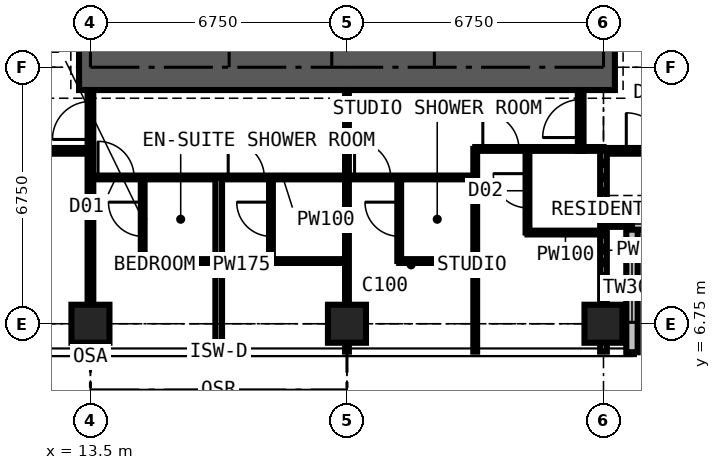
"""IFC4 building model, lengths in metres.
Left out: names, types, materials, properties, quantities, classifications, styles, units other than length and angle.
Written with IfcOpenShell. Run it as: python <this file> out.ifc"""

import sys

from ifc_helpers import new_model, si_unit, direction, frame, frame_2d, origin, origin_2d, place, context, subcontext, project, spatial, rectangle, extrude, element, fill, save


model = new_model("IFC4")
c1 = context("Model", 3, precision=1e-05, world=origin(), true_north=direction((0.0, 1.0)))
c2 = subcontext(c1, "Body", "Model", "MODEL_VIEW")
j1 = project(units=[si_unit("LENGTHUNIT", "METRE"), si_unit("PLANEANGLEUNIT", "RADIAN")], contexts=[c1])
p1 = place(None, origin())
s1 = spatial("IfcSite", under=j1, at=p1, CompositionType="ELEMENT")
p2 = place(p1, origin())
s2 = spatial("IfcBuilding", under=s1, at=p2, CompositionType="ELEMENT")
p3 = place(p2, frame((0.0, 0.0, 243.9)))
s3 = spatial("IfcBuildingStorey", under=s2, at=p3, CompositionType="ELEMENT", Elevation=243.9)
for number, where, z_axis, x_axis in (
    (1, (13.5, 6.75, 0.0), (0.0, 0.0, 1.0), (1.0, 0.0, 0.0)),
    (2, (20.25, 6.75, 0.0), (0.0, 0.0, 1.0), (1.0, 0.0, 0.0)),
    (3, (27.0, 6.75, 0.0), (0.0, 0.0, 1.0), (1.0, 0.0, 0.0)),
):
    element("IfcColumn", number, at=place(p3, frame(where, z_axis=z_axis, x_axis=x_axis)), inside=s3, PredefinedType="COLUMN", context=c2, shape_type="SweptSolid", body=[
        extrude(rectangle(XDim=1.0, YDim=1.0, at=origin_2d()), origin(), (0.0, 0.0, 1.0), 3.6),
    ])
p4 = place(p3, frame((13.2, 13.5, 0.0), z_axis=(0.0, 0.0, 1.0), x_axis=(1.0, 0.0, 0.0)))
e4 = element("IfcWall", 4, at=p4, inside=s3, PredefinedType="SHEAR", context=c2, shape_type="SweptSolid", body=[
    extrude(rectangle(XDim=14.1, YDim=1.2, at=frame_2d((7.05, 0.0))), origin(), (0.0, 0.0, 1.0), 3.6),
])
p5 = place(p3, frame((27.75, 6.0, 0.0), z_axis=(0.0, 0.0, 1.0), x_axis=(0.0, 1.0, 0.0)))
e5 = element("IfcWall", 5, at=p5, inside=s3, PredefinedType="SOLIDWALL", context=c2, shape_type="SweptSolid", body=[
    extrude(rectangle(XDim=3.375, YDim=0.3, at=frame_2d((1.688, 0.0))), origin(), (0.0, 0.0, 1.0), 3.375),
])
p6 = place(p5, frame((0.788, 0.0, 0.6)))
e6 = element("IfcOpeningElement", 6, at=p6, cuts=e5, PredefinedType="OPENING", context=c2, shape_type="SweptSolid", body=[
    extrude(rectangle(XDim=1.8, YDim=2.1, at=frame_2d((0.9, 1.05))), frame((0.0, 0.16, 0.0), z_axis=(0.0, -1.0, 0.0), x_axis=(1.0, 0.0, 0.0)), (0.0, 0.0, 1.0), 0.32),
])
p7 = place(p3, frame((27.75, 9.375, 0.0), z_axis=(0.0, 0.0, 1.0), x_axis=(1.0, 0.0, 0.0)))
e7 = element("IfcWall", 7, at=p7, inside=s3, PredefinedType="SOLIDWALL", context=c2, shape_type="SweptSolid", body=[
    extrude(rectangle(XDim=3.375, YDim=0.3, at=frame_2d((1.688, 0.0))), origin(), (0.0, 0.0, 1.0), 3.375),
])
p8 = place(p7, frame((0.788, 0.0, 0.6)))
e8 = element("IfcOpeningElement", 8, at=p8, cuts=e7, PredefinedType="OPENING", context=c2, shape_type="SweptSolid", body=[
    extrude(rectangle(XDim=1.8, YDim=2.1, at=frame_2d((0.9, 1.05))), frame((0.0, 0.16, 0.0), z_axis=(0.0, -1.0, 0.0), x_axis=(1.0, 0.0, 0.0)), (0.0, 0.0, 1.0), 0.32),
])
p9 = place(p3, frame((10.125, 11.3, 0.0), z_axis=(0.0, 0.0, 1.0), x_axis=(1.0, 0.0, 0.0)))
e9 = element("IfcWall", 9, at=p9, inside=s3, PredefinedType="PARTITIONING", context=c2, shape_type="SweptSolid", body=[
    extrude(rectangle(XDim=3.375, YDim=0.15, at=frame_2d((1.688, 0.0))), origin(), (0.0, 0.0, 1.0), 3.375),
])
p10 = place(p3, frame((13.5, 6.016, 0.0), z_axis=(0.0, 0.0, 1.0), x_axis=(0.0, 1.0, 0.0)))
e10 = element("IfcWall", 10, at=p10, inside=s3, PredefinedType="PARTITIONING", context=c2, shape_type="SweptSolid", body=[
    extrude(rectangle(XDim=6.884, YDim=0.15, at=frame_2d((3.442, 0.0))), origin(), (0.0, 0.0, 1.0), 2.61),
])
p11 = place(p10, frame((5.584, 0.0, 0.0)))
e11 = element("IfcOpeningElement", 11, at=p11, cuts=e10, PredefinedType="OPENING", context=c2, shape_type="SweptSolid", body=[
    extrude(rectangle(XDim=1.0, YDim=2.2, at=frame_2d((0.5, 1.1))), frame((0.0, 0.085, 0.0), z_axis=(0.0, -1.0, 0.0), x_axis=(1.0, 0.0, 0.0)), (0.0, 0.0, 1.0), 0.17),
])
p12 = place(p3, frame((13.5, 10.6, 0.0), z_axis=(0.0, 0.0, 1.0), x_axis=(1.0, 0.0, 0.0)))
e12 = element("IfcWall", 12, at=p12, inside=s3, PredefinedType="PARTITIONING", context=c2, shape_type="SweptSolid", body=[
    extrude(rectangle(XDim=10.125, YDim=0.1, at=frame_2d((5.062, 0.0))), origin(), (0.0, 0.0, 1.0), 3.375),
])
p13 = place(p12, frame((0.2, 0.0, 0.0)))
e13 = element("IfcOpeningElement", 13, at=p13, cuts=e12, PredefinedType="OPENING", context=c2, shape_type="SweptSolid", body=[
    extrude(rectangle(XDim=0.95, YDim=2.2, at=frame_2d((0.475, 1.1))), frame((0.0, 0.06, 0.0), z_axis=(0.0, -1.0, 0.0), x_axis=(1.0, 0.0, 0.0)), (0.0, 0.0, 1.0), 0.12),
])
p14 = place(p12, frame((3.625, 0.0, 0.0)))
e14 = element("IfcOpeningElement", 14, at=p14, cuts=e12, PredefinedType="OPENING", context=c2, shape_type="SweptSolid", body=[
    extrude(rectangle(XDim=0.95, YDim=2.2, at=frame_2d((0.475, 1.1))), frame((0.0, 0.06, 0.0), z_axis=(0.0, -1.0, 0.0), x_axis=(1.0, 0.0, 0.0)), (0.0, 0.0, 1.0), 0.12),
])
p15 = place(p12, frame((6.95, 0.0, 0.0)))
e15 = element("IfcOpeningElement", 15, at=p15, cuts=e12, PredefinedType="OPENING", context=c2, shape_type="SweptSolid", body=[
    extrude(rectangle(XDim=0.95, YDim=2.2, at=frame_2d((0.475, 1.1))), frame((0.0, 0.06, 0.0), z_axis=(0.0, -1.0, 0.0), x_axis=(1.0, 0.0, 0.0)), (0.0, 0.0, 1.0), 0.12),
])
p16 = place(p3, frame((14.875, 8.4, 0.0), z_axis=(0.0, 0.0, 1.0), x_axis=(0.0, 1.0, 0.0)))
e16 = element("IfcWall", 16, at=p16, inside=s3, PredefinedType="PARTITIONING", context=c2, shape_type="SweptSolid", body=[
    extrude(rectangle(XDim=2.2, YDim=0.1, at=frame_2d((1.1, 0.0))), origin(), (0.0, 0.0, 1.0), 3.375),
])
p17 = place(p16, frame((0.65, 0.0, 0.0)))
e17 = element("IfcOpeningElement", 17, at=p17, cuts=e16, PredefinedType="OPENING", context=c2, shape_type="SweptSolid", body=[
    extrude(rectangle(XDim=0.9, YDim=2.2, at=frame_2d((0.45, 1.1))), frame((0.0, 0.06, 0.0), z_axis=(0.0, -1.0, 0.0), x_axis=(1.0, 0.0, 0.0)), (0.0, 0.0, 1.0), 0.12),
])
p18 = place(p3, frame((14.875, 8.4, 0.0), z_axis=(0.0, 0.0, 1.0), x_axis=(1.0, 0.0, 0.0)))
e18 = element("IfcWall", 18, at=p18, inside=s3, PredefinedType="PARTITIONING", context=c2, shape_type="SweptSolid", body=[
    extrude(rectangle(XDim=2.0, YDim=0.1, at=frame_2d((1.0, 0.0))), origin(), (0.0, 0.0, 1.0), 3.375),
])
p19 = place(p3, frame((16.875, 6.016, 0.0), z_axis=(0.0, 0.0, 1.0), x_axis=(0.0, 1.0, 0.0)))
e19 = element("IfcWall", 19, at=p19, inside=s3, PredefinedType="PARTITIONING", context=c2, shape_type="SweptSolid", body=[
    extrude(rectangle(XDim=4.584, YDim=0.175, at=frame_2d((2.292, 0.0))), origin(), (0.0, 0.0, 1.0), 3.375),
])
p20 = place(p3, frame((18.25, 8.4, 0.0), z_axis=(0.0, 0.0, 1.0), x_axis=(0.0, 1.0, 0.0)))
e20 = element("IfcWall", 20, at=p20, inside=s3, PredefinedType="PARTITIONING", context=c2, shape_type="SweptSolid", body=[
    extrude(rectangle(XDim=2.2, YDim=0.1, at=frame_2d((1.1, 0.0))), origin(), (0.0, 0.0, 1.0), 3.375),
])
p21 = place(p20, frame((0.65, 0.0, 0.0)))
e21 = element("IfcOpeningElement", 21, at=p21, cuts=e20, PredefinedType="OPENING", context=c2, shape_type="SweptSolid", body=[
    extrude(rectangle(XDim=0.9, YDim=2.2, at=frame_2d((0.45, 1.1))), frame((0.0, 0.06, 0.0), z_axis=(0.0, -1.0, 0.0), x_axis=(1.0, 0.0, 0.0)), (0.0, 0.0, 1.0), 0.12),
])
p22 = place(p3, frame((18.25, 8.4, 0.0), z_axis=(0.0, 0.0, 1.0), x_axis=(1.0, 0.0, 0.0)))
e22 = element("IfcWall", 22, at=p22, inside=s3, PredefinedType="PARTITIONING", context=c2, shape_type="SweptSolid", body=[
    extrude(rectangle(XDim=2.0, YDim=0.1, at=frame_2d((1.0, 0.0))), origin(), (0.0, 0.0, 1.0), 3.375),
])
p23 = place(p3, frame((20.25, 6.016, 0.0), z_axis=(0.0, 0.0, 1.0), x_axis=(0.0, 1.0, 0.0)))
e23 = element("IfcWall", 23, at=p23, inside=s3, PredefinedType="PARTITIONING", context=c2, shape_type="SweptSolid", body=[
    extrude(rectangle(XDim=6.884, YDim=0.1, at=frame_2d((3.442, 0.0))), origin(), (0.0, 0.0, 1.0), 2.61),
])
p24 = place(p3, frame((21.625, 8.4, 0.0), z_axis=(0.0, 0.0, 1.0), x_axis=(0.0, 1.0, 0.0)))
e24 = element("IfcWall", 24, at=p24, inside=s3, PredefinedType="PARTITIONING", context=c2, shape_type="SweptSolid", body=[
    extrude(rectangle(XDim=2.2, YDim=0.1, at=frame_2d((1.1, 0.0))), origin(), (0.0, 0.0, 1.0), 3.375),
])
p25 = place(p24, frame((0.65, 0.0, 0.0)))
e25 = element("IfcOpeningElement", 25, at=p25, cuts=e24, PredefinedType="OPENING", context=c2, shape_type="SweptSolid", body=[
    extrude(rectangle(XDim=0.9, YDim=2.2, at=frame_2d((0.45, 1.1))), frame((0.0, 0.06, 0.0), z_axis=(0.0, -1.0, 0.0), x_axis=(1.0, 0.0, 0.0)), (0.0, 0.0, 1.0), 0.12),
])
p26 = place(p3, frame((21.625, 8.4, 0.0), z_axis=(0.0, 0.0, 1.0), x_axis=(1.0, 0.0, 0.0)))
e26 = element("IfcWall", 26, at=p26, inside=s3, PredefinedType="PARTITIONING", context=c2, shape_type="SweptSolid", body=[
    extrude(rectangle(XDim=2.0, YDim=0.1, at=frame_2d((1.0, 0.0))), origin(), (0.0, 0.0, 1.0), 3.375),
])
p27 = place(p3, frame((23.625, 6.016, 0.0), z_axis=(0.0, 0.0, 1.0), x_axis=(0.0, 1.0, 0.0)))
e27 = element("IfcWall", 27, at=p27, inside=s3, PredefinedType="PARTITIONING", context=c2, shape_type="SweptSolid", body=[
    extrude(rectangle(XDim=5.334, YDim=0.1, at=frame_2d((2.667, 0.0))), origin(), (0.0, 0.0, 1.0), 3.375),
])
p28 = place(p3, frame((23.625, 11.35, 0.0), z_axis=(0.0, 0.0, 1.0), x_axis=(1.0, 0.0, 0.0)))
e28 = element("IfcWall", 28, at=p28, inside=s3, PredefinedType="PARTITIONING", context=c2, shape_type="SweptSolid", body=[
    extrude(rectangle(XDim=3.375, YDim=0.1, at=frame_2d((1.688, 0.0))), origin(), (0.0, 0.0, 1.0), 3.375),
])
p29 = place(p28, frame((0.2, 0.0, 0.0)))
e29 = element("IfcOpeningElement", 29, at=p29, cuts=e28, PredefinedType="OPENING", context=c2, shape_type="SweptSolid", body=[
    extrude(rectangle(XDim=0.95, YDim=2.2, at=frame_2d((0.475, 1.1))), frame((0.0, 0.06, 0.0), z_axis=(0.0, -1.0, 0.0), x_axis=(1.0, 0.0, 0.0)), (0.0, 0.0, 1.0), 0.12),
])
p30 = place(p3, frame((25.0, 9.15, 0.0), z_axis=(0.0, 0.0, 1.0), x_axis=(0.0, 1.0, 0.0)))
e30 = element("IfcWall", 30, at=p30, inside=s3, PredefinedType="PARTITIONING", context=c2, shape_type="SweptSolid", body=[
    extrude(rectangle(XDim=2.2, YDim=0.1, at=frame_2d((1.1, 0.0))), origin(), (0.0, 0.0, 1.0), 3.375),
])
p31 = place(p30, frame((0.65, 0.0, 0.0)))
e31 = element("IfcOpeningElement", 31, at=p31, cuts=e30, PredefinedType="OPENING", context=c2, shape_type="SweptSolid", body=[
    extrude(rectangle(XDim=0.9, YDim=2.2, at=frame_2d((0.45, 1.1))), frame((0.0, 0.06, 0.0), z_axis=(0.0, -1.0, 0.0), x_axis=(1.0, 0.0, 0.0)), (0.0, 0.0, 1.0), 0.12),
])
p32 = place(p3, frame((25.0, 9.15, 0.0), z_axis=(0.0, 0.0, 1.0), x_axis=(1.0, 0.0, 0.0)))
e32 = element("IfcWall", 32, at=p32, inside=s3, PredefinedType="PARTITIONING", context=c2, shape_type="SweptSolid", body=[
    extrude(rectangle(XDim=2.0, YDim=0.1, at=frame_2d((1.0, 0.0))), origin(), (0.0, 0.0, 1.0), 3.375),
])
p33 = place(p3, frame((26.4, 11.3, 0.0), z_axis=(0.0, 0.0, 1.0), x_axis=(0.0, 1.0, 0.0)))
e33 = element("IfcWall", 33, at=p33, inside=s3, PredefinedType="PARTITIONING", context=c2, shape_type="SweptSolid", body=[
    extrude(rectangle(XDim=1.6, YDim=0.15, at=frame_2d((0.8, 0.0))), origin(), (0.0, 0.0, 1.0), 3.375),
])
p34 = place(p33, frame((0.35, 0.0, 0.0)))
e34 = element("IfcOpeningElement", 34, at=p34, cuts=e33, PredefinedType="OPENING", context=c2, shape_type="SweptSolid", body=[
    extrude(rectangle(XDim=1.0, YDim=2.2, at=frame_2d((0.5, 1.1))), frame((0.0, 0.085, 0.0), z_axis=(0.0, -1.0, 0.0), x_axis=(1.0, 0.0, 0.0)), (0.0, 0.0, 1.0), 0.17),
])
p35 = place(p3, frame((27.0, 11.3, 0.0), z_axis=(0.0, 0.0, 1.0), x_axis=(1.0, 0.0, 0.0)))
e35 = element("IfcWall", 35, at=p35, inside=s3, PredefinedType="PARTITIONING", context=c2, shape_type="SweptSolid", body=[
    extrude(rectangle(XDim=3.375, YDim=0.15, at=frame_2d((1.688, 0.0))), origin(), (0.0, 0.0, 1.0), 3.375),
])
p36 = place(p35, frame((0.6, 0.0, 0.0)))
e36 = element("IfcOpeningElement", 36, at=p36, cuts=e35, PredefinedType="OPENING", context=c2, shape_type="SweptSolid", body=[
    extrude(rectangle(XDim=1.0, YDim=2.2, at=frame_2d((0.5, 1.1))), frame((0.0, 0.085, 0.0), z_axis=(0.0, -1.0, 0.0), x_axis=(1.0, 0.0, 0.0)), (0.0, 0.0, 1.0), 0.17),
])
p37 = place(p3, frame((27.0, 6.016, 0.0), z_axis=(0.0, 0.0, 1.0), x_axis=(0.0, 1.0, 0.0)))
e37 = element("IfcWall", 37, at=p37, inside=s3, PredefinedType="PARTITIONING", context=c2, shape_type="SweptSolid", body=[
    extrude(rectangle(XDim=5.334, YDim=0.175, at=frame_2d((2.667, 0.0))), origin(), (0.0, 0.0, 1.0), 2.877),
])
p38 = place(p3, frame((27.0, 9.375, 0.0), z_axis=(0.0, 0.0, 1.0), x_axis=(1.0, 0.0, 0.0)))
e38 = element("IfcWall", 38, at=p38, inside=s3, PredefinedType="PARTITIONING", context=c2, shape_type="SweptSolid", body=[
    extrude(rectangle(XDim=0.734, YDim=0.15, at=frame_2d((0.367, 0.0))), origin(), (0.0, 0.0, 1.0), 3.375),
])
p39 = place(p6, origin())
e39 = element("IfcWindow", 39, at=p39, inside=s3, PartitioningType="SINGLE_PANEL", PredefinedType="WINDOW", context=c2, shape_type="SweptSolid", body=[
    extrude(rectangle(XDim=1.8, YDim=2.1, at=frame_2d((0.9, 1.05))), frame((0.0, 0.03, 0.0), z_axis=(0.0, -1.0, 0.0), x_axis=(1.0, 0.0, 0.0)), (0.0, 0.0, 1.0), 0.06),
])
fill(e6, e39)
p40 = place(p13, origin())
e40 = element("IfcDoor", 40, at=p40, inside=s3, OperationType="SINGLE_SWING_LEFT", PredefinedType="DOOR", context=c2, shape_type="SweptSolid", body=[
    extrude(rectangle(XDim=0.95, YDim=2.2, at=frame_2d((0.475, 1.1))), frame((0.0, 0.025, 0.0), z_axis=(0.0, -1.0, 0.0), x_axis=(1.0, 0.0, 0.0)), (0.0, 0.0, 1.0), 0.05),
])
fill(e13, e40)
p41 = place(p17, origin())
e41 = element("IfcDoor", 41, at=p41, inside=s3, OperationType="SINGLE_SWING_RIGHT", PredefinedType="DOOR", context=c2, shape_type="SweptSolid", body=[
    extrude(rectangle(XDim=0.9, YDim=2.2, at=frame_2d((0.45, 1.1))), frame((0.0, 0.025, 0.0), z_axis=(0.0, -1.0, 0.0), x_axis=(1.0, 0.0, 0.0)), (0.0, 0.0, 1.0), 0.05),
])
fill(e17, e41)
p42 = place(p14, origin())
e42 = element("IfcDoor", 42, at=p42, inside=s3, OperationType="SINGLE_SWING_LEFT", PredefinedType="DOOR", context=c2, shape_type="SweptSolid", body=[
    extrude(rectangle(XDim=0.95, YDim=2.2, at=frame_2d((0.475, 1.1))), frame((0.0, 0.025, 0.0), z_axis=(0.0, -1.0, 0.0), x_axis=(1.0, 0.0, 0.0)), (0.0, 0.0, 1.0), 0.05),
])
fill(e14, e42)
p43 = place(p21, origin())
e43 = element("IfcDoor", 43, at=p43, inside=s3, OperationType="SINGLE_SWING_RIGHT", PredefinedType="DOOR", context=c2, shape_type="SweptSolid", body=[
    extrude(rectangle(XDim=0.9, YDim=2.2, at=frame_2d((0.45, 1.1))), frame((0.0, 0.025, 0.0), z_axis=(0.0, -1.0, 0.0), x_axis=(1.0, 0.0, 0.0)), (0.0, 0.0, 1.0), 0.05),
])
fill(e21, e43)
p44 = place(p11, origin())
e44 = element("IfcDoor", 44, at=p44, inside=s3, OperationType="SINGLE_SWING_LEFT", PredefinedType="DOOR", context=c2, shape_type="SweptSolid", body=[
    extrude(rectangle(XDim=1.0, YDim=2.2, at=frame_2d((0.5, 1.1))), frame((0.0, 0.025, 0.0), z_axis=(0.0, -1.0, 0.0), x_axis=(1.0, 0.0, 0.0)), (0.0, 0.0, 1.0), 0.05),
])
fill(e11, e44)
p45 = place(p15, origin())
e45 = element("IfcDoor", 45, at=p45, inside=s3, OperationType="SINGLE_SWING_LEFT", PredefinedType="DOOR", context=c2, shape_type="SweptSolid", body=[
    extrude(rectangle(XDim=0.95, YDim=2.2, at=frame_2d((0.475, 1.1))), frame((0.0, 0.025, 0.0), z_axis=(0.0, -1.0, 0.0), x_axis=(1.0, 0.0, 0.0)), (0.0, 0.0, 1.0), 0.05),
])
fill(e15, e45)
p46 = place(p25, origin())
e46 = element("IfcDoor", 46, at=p46, inside=s3, OperationType="SINGLE_SWING_RIGHT", PredefinedType="DOOR", context=c2, shape_type="SweptSolid", body=[
    extrude(rectangle(XDim=0.9, YDim=2.2, at=frame_2d((0.45, 1.1))), frame((0.0, 0.025, 0.0), z_axis=(0.0, -1.0, 0.0), x_axis=(1.0, 0.0, 0.0)), (0.0, 0.0, 1.0), 0.05),
])
fill(e25, e46)
p47 = place(p29, origin())
e47 = element("IfcDoor", 47, at=p47, inside=s3, OperationType="SINGLE_SWING_LEFT", PredefinedType="DOOR", context=c2, shape_type="SweptSolid", body=[
    extrude(rectangle(XDim=0.95, YDim=2.2, at=frame_2d((0.475, 1.1))), frame((0.0, 0.025, 0.0), z_axis=(0.0, -1.0, 0.0), x_axis=(1.0, 0.0, 0.0)), (0.0, 0.0, 1.0), 0.05),
])
fill(e29, e47)
p48 = place(p31, origin())
e48 = element("IfcDoor", 48, at=p48, inside=s3, OperationType="SINGLE_SWING_RIGHT", PredefinedType="DOOR", context=c2, shape_type="SweptSolid", body=[
    extrude(rectangle(XDim=0.9, YDim=2.2, at=frame_2d((0.45, 1.1))), frame((0.0, 0.025, 0.0), z_axis=(0.0, -1.0, 0.0), x_axis=(1.0, 0.0, 0.0)), (0.0, 0.0, 1.0), 0.05),
])
fill(e31, e48)
p49 = place(p36, origin())
e49 = element("IfcDoor", 49, at=p49, inside=s3, OperationType="SINGLE_SWING_LEFT", PredefinedType="DOOR", context=c2, shape_type="SweptSolid", body=[
    extrude(rectangle(XDim=1.0, YDim=2.2, at=frame_2d((0.5, 1.1))), frame((0.0, 0.025, 0.0), z_axis=(0.0, -1.0, 0.0), x_axis=(1.0, 0.0, 0.0)), (0.0, 0.0, 1.0), 0.05),
])
fill(e36, e49)
p50 = place(p34, origin())
e50 = element("IfcDoor", 50, at=p50, inside=s3, OperationType="SINGLE_SWING_LEFT", PredefinedType="DOOR", context=c2, shape_type="SweptSolid", body=[
    extrude(rectangle(XDim=1.0, YDim=2.2, at=frame_2d((0.5, 1.1))), frame((0.0, 0.025, 0.0), z_axis=(0.0, -1.0, 0.0), x_axis=(1.0, 0.0, 0.0)), (0.0, 0.0, 1.0), 0.05),
])
fill(e34, e50)
save(model, sys.argv[1])
